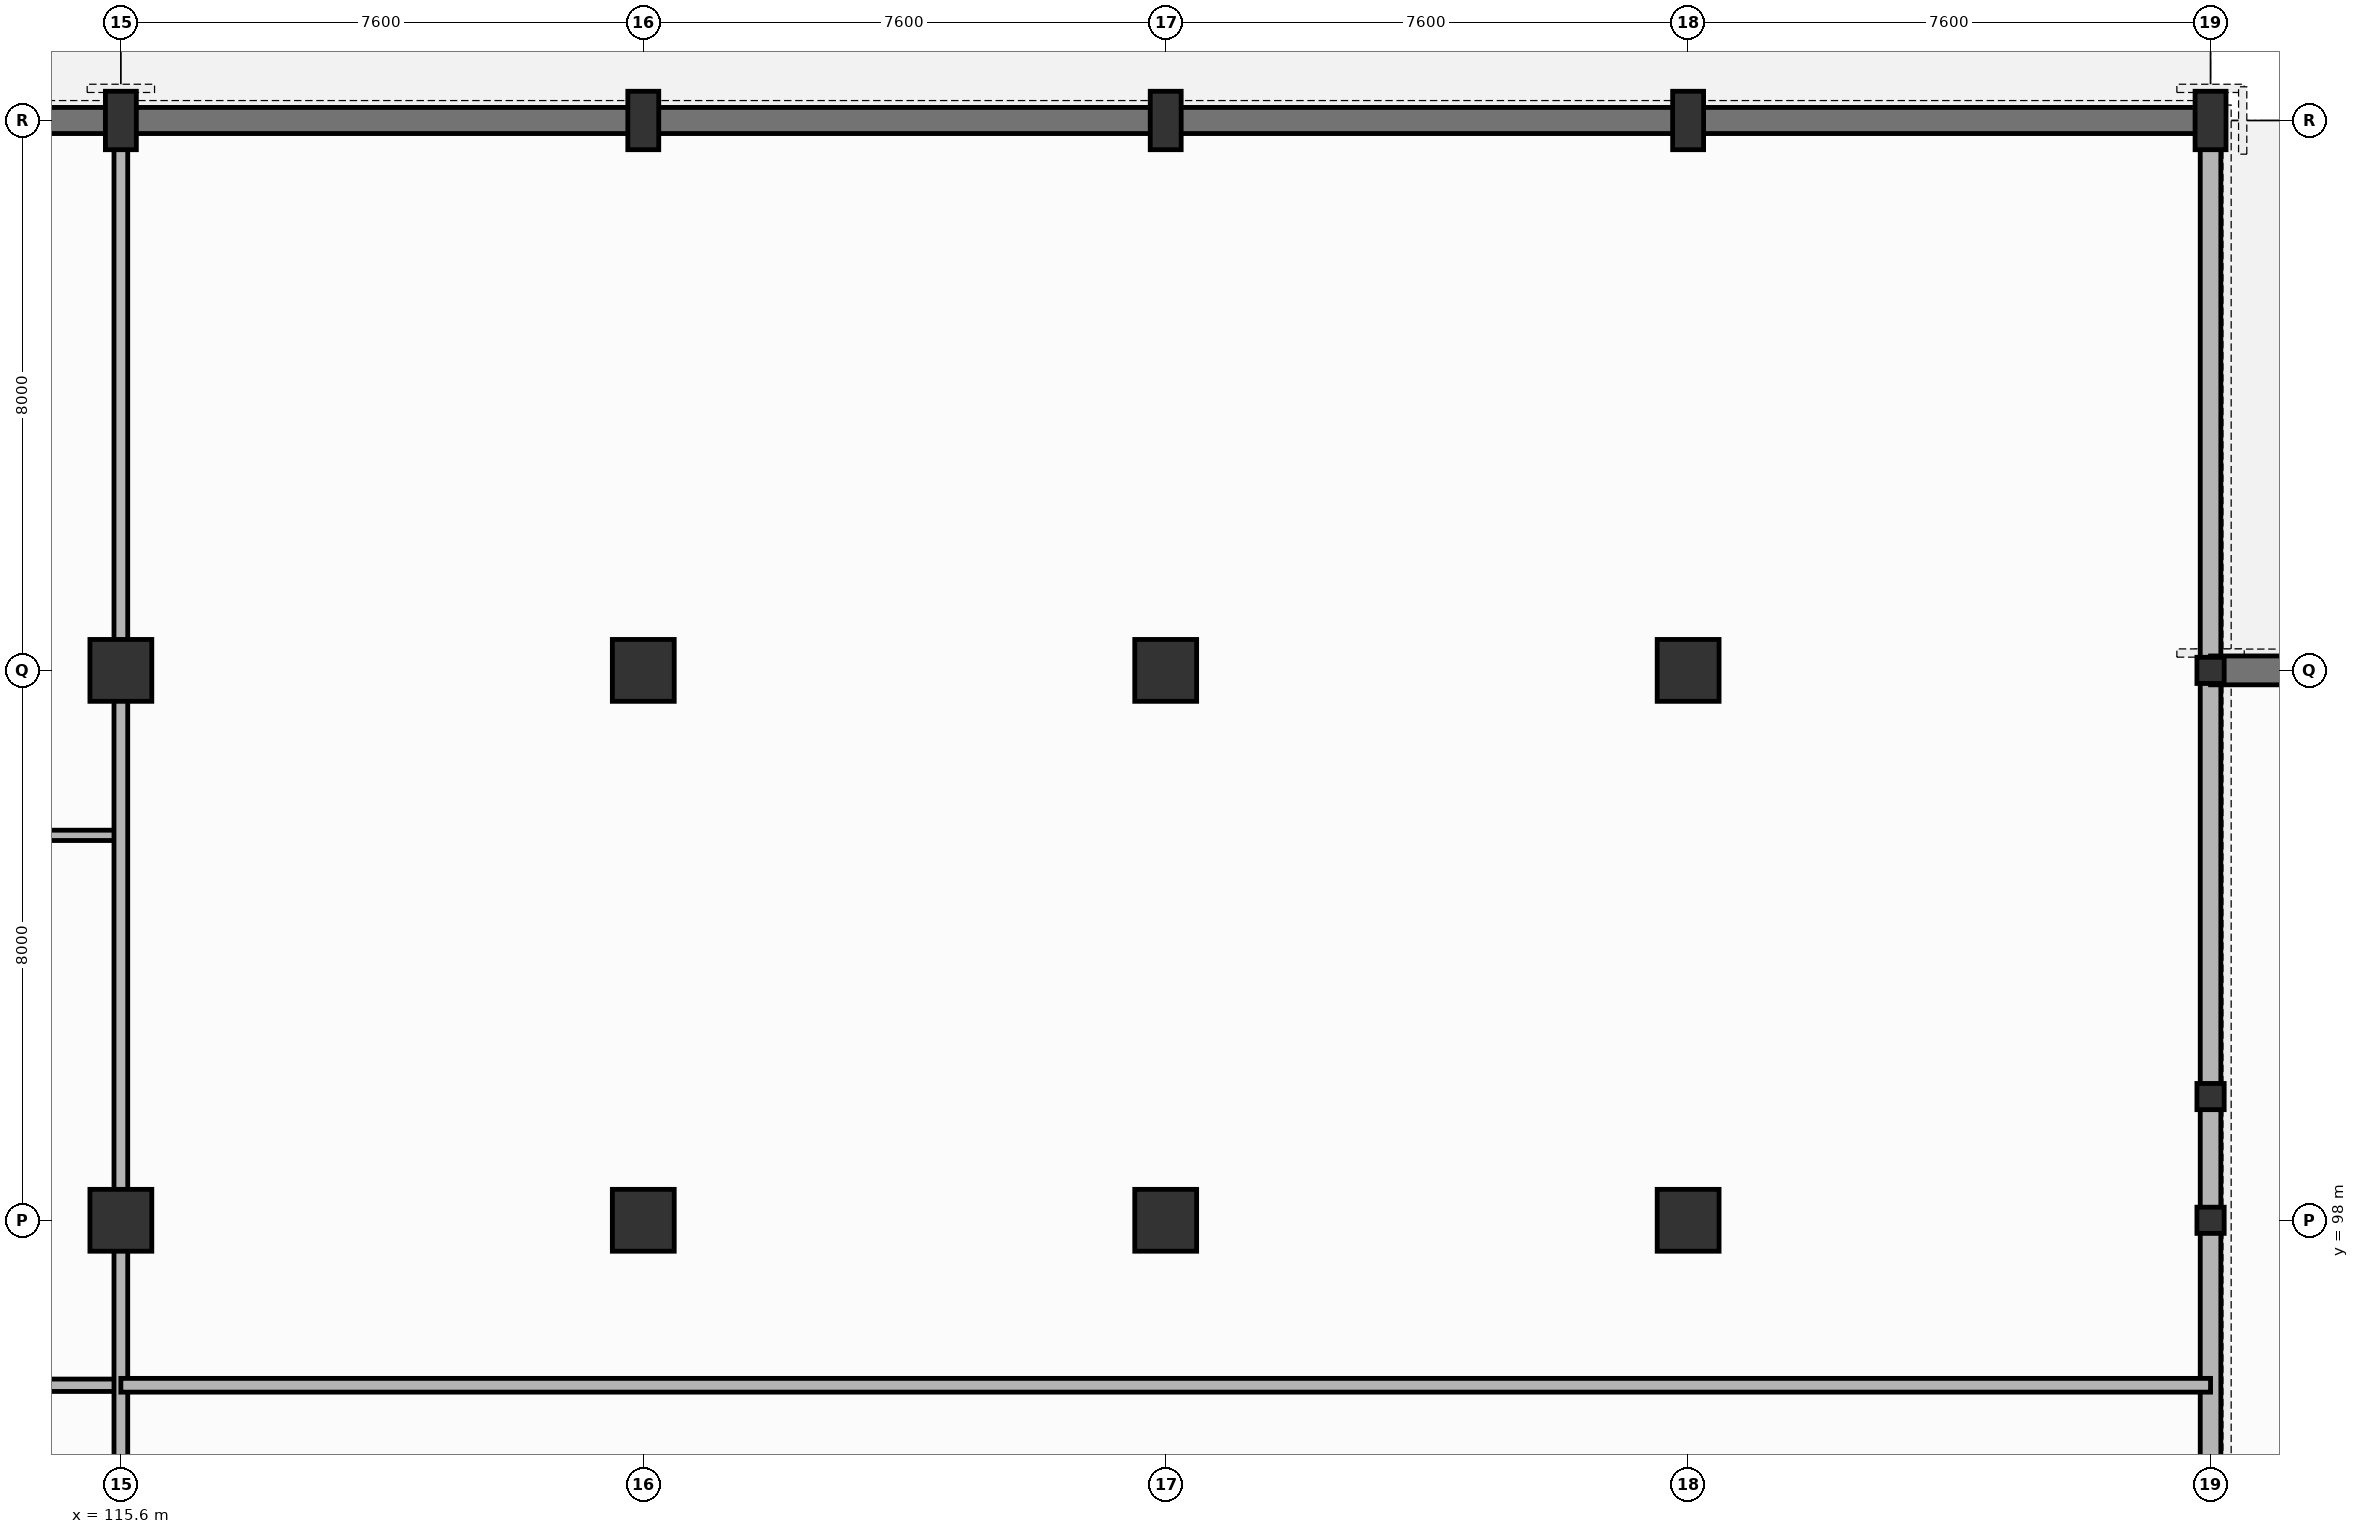
"""IFC4 building model, lengths in metres.
Left out: names, types, materials, properties, quantities, classifications, styles, units other than length and angle.
Written with IfcOpenShell. Run it as: python <this file> out.ifc"""

import sys

from ifc_helpers import new_model, si_unit, direction, frame, frame_2d, origin, origin_2d, place, context, subcontext, project, spatial, rectangle, i_section, extrude, element, fill, save


model = new_model("IFC4")
c1 = context("Model", 3, precision=1e-05, world=origin(), true_north=direction((0.0, 1.0)))
c2 = subcontext(c1, "Body", "Model", "MODEL_VIEW")
j1 = project(units=[si_unit("LENGTHUNIT", "METRE"), si_unit("PLANEANGLEUNIT", "RADIAN")], contexts=[c1])
p1 = place(None, origin())
s1 = spatial("IfcSite", under=j1, at=p1, CompositionType="ELEMENT")
p2 = place(p1, origin())
s2 = spatial("IfcBuilding", under=s1, at=p2, CompositionType="ELEMENT")
p3 = place(p2, origin())
s3 = spatial("IfcBuildingStorey", under=s2, at=p3, CompositionType="ELEMENT", Elevation=0.0)
for number, where, z_axis, x_axis in (
    (1, (115.6, 98.0, 0.0), (0.0, 0.0, 1.0), (1.0, 0.0, 0.0)),
    (2, (115.6, 106.0, 0.0), (0.0, 0.0, 1.0), (1.0, 0.0, 0.0)),
):
    element("IfcColumn", number, at=place(p3, frame(where, z_axis=z_axis, x_axis=x_axis)), inside=s3, PredefinedType="COLUMN", context=c2, shape_type="SweptSolid", body=[
        extrude(rectangle(XDim=0.9, YDim=0.9, at=origin_2d()), origin(), (0.0, 0.0, 1.0), 5.1),
    ])
p4 = place(p3, frame((115.6, 114.0, 0.0), z_axis=(0.0, 0.0, 1.0), x_axis=(0.0, 1.0, 0.0)))
e3 = element("IfcColumn", 3, at=p4, inside=s3, PredefinedType="COLUMN", context=c2, shape_type="SweptSolid", body=[
    extrude(rectangle(XDim=0.45, YDim=0.85, at=origin_2d()), origin(), (0.0, 0.0, 1.0), 5.1),
])
for number, where, z_axis, x_axis in (
    (4, (123.2, 98.0, 0.0), (0.0, 0.0, 1.0), (1.0, 0.0, 0.0)),
    (5, (123.2, 106.0, 0.0), (0.0, 0.0, 1.0), (1.0, 0.0, 0.0)),
):
    element("IfcColumn", number, at=place(p3, frame(where, z_axis=z_axis, x_axis=x_axis)), inside=s3, PredefinedType="COLUMN", context=c2, shape_type="SweptSolid", body=[
        extrude(rectangle(XDim=0.9, YDim=0.9, at=origin_2d()), origin(), (0.0, 0.0, 1.0), 5.1),
    ])
p5 = place(p3, frame((123.2, 114.0, 0.0), z_axis=(0.0, 0.0, 1.0), x_axis=(0.0, 1.0, 0.0)))
e6 = element("IfcColumn", 6, at=p5, inside=s3, PredefinedType="COLUMN", context=c2, shape_type="SweptSolid", body=[
    extrude(rectangle(XDim=0.45, YDim=0.85, at=origin_2d()), origin(), (0.0, 0.0, 1.0), 5.1),
])
for number, where, z_axis, x_axis in (
    (7, (130.8, 98.0, 0.0), (0.0, 0.0, 1.0), (1.0, 0.0, 0.0)),
    (8, (130.8, 106.0, 0.0), (0.0, 0.0, 1.0), (1.0, 0.0, 0.0)),
):
    element("IfcColumn", number, at=place(p3, frame(where, z_axis=z_axis, x_axis=x_axis)), inside=s3, PredefinedType="COLUMN", context=c2, shape_type="SweptSolid", body=[
        extrude(rectangle(XDim=0.9, YDim=0.9, at=origin_2d()), origin(), (0.0, 0.0, 1.0), 5.1),
    ])
p6 = place(p3, frame((130.8, 114.0, 0.0), z_axis=(0.0, 0.0, 1.0), x_axis=(0.0, 1.0, 0.0)))
e9 = element("IfcColumn", 9, at=p6, inside=s3, PredefinedType="COLUMN", context=c2, shape_type="SweptSolid", body=[
    extrude(rectangle(XDim=0.45, YDim=0.85, at=origin_2d()), origin(), (0.0, 0.0, 1.0), 5.1),
])
for number, where, z_axis, x_axis in (
    (10, (138.4, 98.0, 0.0), (0.0, 0.0, 1.0), (1.0, 0.0, 0.0)),
    (11, (138.4, 106.0, 0.0), (0.0, 0.0, 1.0), (1.0, 0.0, 0.0)),
):
    element("IfcColumn", number, at=place(p3, frame(where, z_axis=z_axis, x_axis=x_axis)), inside=s3, PredefinedType="COLUMN", context=c2, shape_type="SweptSolid", body=[
        extrude(rectangle(XDim=0.9, YDim=0.9, at=origin_2d()), origin(), (0.0, 0.0, 1.0), 5.1),
    ])
p7 = place(p3, frame((138.4, 114.0, 0.0), z_axis=(0.0, 0.0, 1.0), x_axis=(0.0, 1.0, 0.0)))
e12 = element("IfcColumn", 12, at=p7, inside=s3, PredefinedType="COLUMN", context=c2, shape_type="SweptSolid", body=[
    extrude(rectangle(XDim=0.45, YDim=0.85, at=origin_2d()), origin(), (0.0, 0.0, 1.0), 5.1),
])
for number, where, z_axis, x_axis in (
    (13, (146.0, 98.0, 0.0), (0.0, 0.0, 1.0), (1.0, 0.0, 0.0)),
    (14, (146.0, 106.0, 0.0), (0.0, 0.0, 1.0), (1.0, 0.0, 0.0)),
):
    element("IfcColumn", number, at=place(p3, frame(where, z_axis=z_axis, x_axis=x_axis)), inside=s3, PredefinedType="COLUMN", context=c2, shape_type="SweptSolid", body=[
        extrude(i_section(OverallWidth=0.396, OverallDepth=0.381, WebThickness=0.019, FlangeThickness=0.03, at=origin_2d()), origin(), (0.0, 0.0, 1.0), 5.1),
    ])
p8 = place(p3, frame((146.0, 114.0, 0.0), z_axis=(0.0, 0.0, 1.0), x_axis=(0.0, 1.0, 0.0)))
e15 = element("IfcColumn", 15, at=p8, inside=s3, PredefinedType="COLUMN", context=c2, shape_type="SweptSolid", body=[
    extrude(rectangle(XDim=0.45, YDim=0.85, at=origin_2d()), origin(), (0.0, 0.0, 1.0), 5.1),
])
p9 = place(p3, frame((146.0, 99.8, 0.0), z_axis=(0.0, 0.0, 1.0), x_axis=(1.0, 0.0, 0.0)))
e16 = element("IfcColumn", 16, at=p9, inside=s3, PredefinedType="COLUMN", context=c2, shape_type="SweptSolid", body=[
    extrude(i_section(OverallWidth=0.396, OverallDepth=0.381, WebThickness=0.019, FlangeThickness=0.03, at=origin_2d()), origin(), (0.0, 0.0, 1.0), 5.1),
])
p10 = place(p3, frame((108.0, 114.0, 0.0), z_axis=(0.0, 0.0, 1.0), x_axis=(1.0, 0.0, 0.0)))
e17 = element("IfcWall", 17, at=p10, inside=s3, PredefinedType="SOLIDWALL", context=c2, shape_type="SweptSolid", body=[
    extrude(rectangle(XDim=7.6, YDim=0.38, at=frame_2d((3.8, 0.0))), origin(), (0.0, 0.0, 1.0), 4.8),
])
p11 = place(p10, frame((2.2, 0.0, 1.15)))
e18 = element("IfcOpeningElement", 18, at=p11, cuts=e17, PredefinedType="OPENING", context=c2, shape_type="SweptSolid", body=[
    extrude(rectangle(XDim=0.75, YDim=2.2, at=frame_2d((0.375, 1.1))), frame((0.0, 0.2, 0.0), z_axis=(0.0, -1.0, 0.0), x_axis=(1.0, 0.0, 0.0)), (0.0, 0.0, 1.0), 0.4),
])
p12 = place(p10, frame((5.4, 0.0, 1.15)))
e19 = element("IfcOpeningElement", 19, at=p12, cuts=e17, PredefinedType="OPENING", context=c2, shape_type="SweptSolid", body=[
    extrude(rectangle(XDim=0.9, YDim=2.2, at=frame_2d((0.45, 1.1))), frame((0.0, 0.2, 0.0), z_axis=(0.0, -1.0, 0.0), x_axis=(1.0, 0.0, 0.0)), (0.0, 0.0, 1.0), 0.4),
])
p13 = place(p3, frame((115.6, 114.0, 0.0), z_axis=(0.0, 0.0, 1.0), x_axis=(1.0, 0.0, 0.0)))
e20 = element("IfcWall", 20, at=p13, inside=s3, PredefinedType="SOLIDWALL", context=c2, shape_type="SweptSolid", body=[
    extrude(rectangle(XDim=30.4, YDim=0.38, at=frame_2d((15.2, 0.0))), origin(), (0.0, 0.0, 1.0), 4.8),
])
p14 = place(p13, frame((1.95, 0.0, 0.0)))
e21 = element("IfcOpeningElement", 21, at=p14, cuts=e20, PredefinedType="OPENING", context=c2, shape_type="SweptSolid", body=[
    extrude(rectangle(XDim=3.7, YDim=4.0, at=frame_2d((1.85, 2.0))), frame((0.0, 0.2, 0.0), z_axis=(0.0, -1.0, 0.0), x_axis=(1.0, 0.0, 0.0)), (0.0, 0.0, 1.0), 0.4),
])
p15 = place(p13, frame((9.55, 0.0, 0.0)))
e22 = element("IfcOpeningElement", 22, at=p15, cuts=e20, PredefinedType="OPENING", context=c2, shape_type="SweptSolid", body=[
    extrude(rectangle(XDim=3.7, YDim=4.0, at=frame_2d((1.85, 2.0))), frame((0.0, 0.2, 0.0), z_axis=(0.0, -1.0, 0.0), x_axis=(1.0, 0.0, 0.0)), (0.0, 0.0, 1.0), 0.4),
])
p16 = place(p13, frame((17.15, 0.0, 0.0)))
e23 = element("IfcOpeningElement", 23, at=p16, cuts=e20, PredefinedType="OPENING", context=c2, shape_type="SweptSolid", body=[
    extrude(rectangle(XDim=3.7, YDim=4.0, at=frame_2d((1.85, 2.0))), frame((0.0, 0.2, 0.0), z_axis=(0.0, -1.0, 0.0), x_axis=(1.0, 0.0, 0.0)), (0.0, 0.0, 1.0), 0.4),
])
p17 = place(p13, frame((24.75, 0.0, 0.0)))
e24 = element("IfcOpeningElement", 24, at=p17, cuts=e20, PredefinedType="OPENING", context=c2, shape_type="SweptSolid", body=[
    extrude(rectangle(XDim=3.7, YDim=4.0, at=frame_2d((1.85, 2.0))), frame((0.0, 0.2, 0.0), z_axis=(0.0, -1.0, 0.0), x_axis=(1.0, 0.0, 0.0)), (0.0, 0.0, 1.0), 0.4),
])
p18 = place(p3, frame((146.0, 82.2, 0.0), z_axis=(0.0, 0.0, 1.0), x_axis=(0.0, 1.0, 0.0)))
e25 = element("IfcWall", 25, at=p18, inside=s3, PredefinedType="SOLIDWALL", context=c2, shape_type="SweptSolid", body=[
    extrude(rectangle(XDim=31.8, YDim=0.3, at=frame_2d((15.9, 0.0))), origin(), (0.0, 0.0, 1.0), 4.145),
])
p19 = place(p18, frame((24.45, 0.0, 0.0)))
e26 = element("IfcOpeningElement", 26, at=p19, cuts=e25, PredefinedType="OPENING", context=c2, shape_type="SweptSolid", body=[
    extrude(rectangle(XDim=3.2, YDim=3.6, at=frame_2d((1.6, 1.8))), frame((0.0, 0.16, 0.0), z_axis=(0.0, -1.0, 0.0), x_axis=(1.0, 0.0, 0.0)), (0.0, 0.0, 1.0), 0.32),
])
p20 = place(p18, frame((28.0, 0.0, 0.0)))
e27 = element("IfcOpeningElement", 27, at=p20, cuts=e25, PredefinedType="OPENING", context=c2, shape_type="SweptSolid", body=[
    extrude(rectangle(XDim=3.2, YDim=3.6, at=frame_2d((1.6, 1.8))), frame((0.0, 0.16, 0.0), z_axis=(0.0, -1.0, 0.0), x_axis=(1.0, 0.0, 0.0)), (0.0, 0.0, 1.0), 0.32),
])
p21 = place(p3, frame((146.0, 106.0, 0.0), z_axis=(0.0, 0.0, 1.0), x_axis=(1.0, 0.0, 0.0)))
e28 = element("IfcWall", 28, at=p21, inside=s3, PredefinedType="SOLIDWALL", context=c2, shape_type="SweptSolid", body=[
    extrude(rectangle(XDim=16.6, YDim=0.42, at=frame_2d((8.3, 0.0))), origin(), (0.0, 0.0, 1.0), 4.8),
])
p22 = place(p21, frame((3.5, 0.0, 1.0)))
e29 = element("IfcOpeningElement", 29, at=p22, cuts=e28, PredefinedType="OPENING", context=c2, shape_type="SweptSolid", body=[
    extrude(rectangle(XDim=1.2, YDim=2.1, at=frame_2d((0.6, 1.05))), frame((0.0, 0.22, 0.0), z_axis=(0.0, -1.0, 0.0), x_axis=(1.0, 0.0, 0.0)), (0.0, 0.0, 1.0), 0.44),
])
p23 = place(p21, frame((10.5, 0.0, 1.0)))
e30 = element("IfcOpeningElement", 30, at=p23, cuts=e28, PredefinedType="OPENING", context=c2, shape_type="SweptSolid", body=[
    extrude(rectangle(XDim=1.2, YDim=2.1, at=frame_2d((0.6, 1.05))), frame((0.0, 0.22, 0.0), z_axis=(0.0, -1.0, 0.0), x_axis=(1.0, 0.0, 0.0)), (0.0, 0.0, 1.0), 0.44),
])
p24 = place(p3, frame((111.4, 95.6, 0.0), z_axis=(0.0, 0.0, 1.0), x_axis=(1.0, 0.0, 0.0)))
e31 = element("IfcWall", 31, at=p24, inside=s3, PredefinedType="PLUMBINGWALL", context=c2, shape_type="SweptSolid", body=[
    extrude(rectangle(XDim=4.2, YDim=0.18, at=frame_2d((2.1, 0.0))), origin(), (0.0, 0.0, 1.0), 4.8),
])
p25 = place(p24, frame((1.625, 0.0, 0.0)))
e32 = element("IfcOpeningElement", 32, at=p25, cuts=e31, PredefinedType="OPENING", context=c2, shape_type="SweptSolid", body=[
    extrude(rectangle(XDim=0.95, YDim=2.15, at=frame_2d((0.475, 1.075))), frame((0.0, 0.1, 0.0), z_axis=(0.0, -1.0, 0.0), x_axis=(1.0, 0.0, 0.0)), (0.0, 0.0, 1.0), 0.2),
])
p26 = place(p3, frame((99.0, 103.6, 0.0), z_axis=(0.0, 0.0, 1.0), x_axis=(1.0, 0.0, 0.0)))
e33 = element("IfcWall", 33, at=p26, inside=s3, PredefinedType="PARTITIONING", context=c2, shape_type="SweptSolid", body=[
    extrude(rectangle(XDim=16.6, YDim=0.15, at=frame_2d((8.3, 0.0))), origin(), (0.0, 0.0, 1.0), 4.8),
])
p27 = place(p26, frame((7.5, 0.0, 0.0)))
e34 = element("IfcOpeningElement", 34, at=p27, cuts=e33, PredefinedType="OPENING", context=c2, shape_type="SweptSolid", body=[
    extrude(rectangle(XDim=1.0, YDim=2.15, at=frame_2d((0.5, 1.075))), frame((0.0, 0.085, 0.0), z_axis=(0.0, -1.0, 0.0), x_axis=(1.0, 0.0, 0.0)), (0.0, 0.0, 1.0), 0.17),
])
p28 = place(p3, frame((115.6, 82.2, 0.0), z_axis=(0.0, 0.0, 1.0), x_axis=(0.0, 1.0, 0.0)))
e35 = element("IfcWall", 35, at=p28, inside=s3, PredefinedType="PARTITIONING", context=c2, shape_type="SweptSolid", body=[
    extrude(rectangle(XDim=31.8, YDim=0.2, at=frame_2d((15.9, 0.0))), origin(), (0.0, 0.0, 1.0), 4.045),
])
p29 = place(p28, frame((18.0, 0.0, 0.0)))
e36 = element("IfcOpeningElement", 36, at=p29, cuts=e35, PredefinedType="OPENING", context=c2, shape_type="SweptSolid", body=[
    extrude(rectangle(XDim=1.6, YDim=2.2, at=frame_2d((0.8, 1.1))), frame((0.0, 0.11, 0.0), z_axis=(0.0, -1.0, 0.0), x_axis=(1.0, 0.0, 0.0)), (0.0, 0.0, 1.0), 0.22),
])
p30 = place(p3, frame((115.6, 95.6, 0.0), z_axis=(0.0, 0.0, 1.0), x_axis=(1.0, 0.0, 0.0)))
e37 = element("IfcWall", 37, at=p30, inside=s3, PredefinedType="PARTITIONING", context=c2, shape_type="SweptSolid", body=[
    extrude(rectangle(XDim=30.4, YDim=0.2, at=frame_2d((15.2, 0.0))), origin(), (0.0, 0.0, 1.0), 4.045),
])
p31 = place(p30, frame((6.0, 0.0, 0.0)))
e38 = element("IfcOpeningElement", 38, at=p31, cuts=e37, PredefinedType="OPENING", context=c2, shape_type="SweptSolid", body=[
    extrude(rectangle(XDim=1.6, YDim=2.2, at=frame_2d((0.8, 1.1))), frame((0.0, 0.11, 0.0), z_axis=(0.0, -1.0, 0.0), x_axis=(1.0, 0.0, 0.0)), (0.0, 0.0, 1.0), 0.22),
])
p32 = place(p30, frame((20.0, 0.0, 0.0)))
e39 = element("IfcOpeningElement", 39, at=p32, cuts=e37, PredefinedType="OPENING", context=c2, shape_type="SweptSolid", body=[
    extrude(rectangle(XDim=1.6, YDim=2.2, at=frame_2d((0.8, 1.1))), frame((0.0, 0.11, 0.0), z_axis=(0.0, -1.0, 0.0), x_axis=(1.0, 0.0, 0.0)), (0.0, 0.0, 1.0), 0.22),
])
p33 = place(p14, origin())
e40 = element("IfcDoor", 40, at=p33, inside=s3, OperationType="ROLLINGUP", PredefinedType="GATE", context=c2, shape_type="SweptSolid", body=[
    extrude(rectangle(XDim=3.7, YDim=4.0, at=frame_2d((1.85, 2.0))), frame((0.0, 0.025, 0.0), z_axis=(0.0, -1.0, 0.0), x_axis=(1.0, 0.0, 0.0)), (0.0, 0.0, 1.0), 0.05),
])
fill(e21, e40)
p34 = place(p15, origin())
e41 = element("IfcDoor", 41, at=p34, inside=s3, OperationType="ROLLINGUP", PredefinedType="GATE", context=c2, shape_type="SweptSolid", body=[
    extrude(rectangle(XDim=3.7, YDim=4.0, at=frame_2d((1.85, 2.0))), frame((0.0, 0.025, 0.0), z_axis=(0.0, -1.0, 0.0), x_axis=(1.0, 0.0, 0.0)), (0.0, 0.0, 1.0), 0.05),
])
fill(e22, e41)
p35 = place(p16, origin())
e42 = element("IfcDoor", 42, at=p35, inside=s3, OperationType="ROLLINGUP", PredefinedType="GATE", context=c2, shape_type="SweptSolid", body=[
    extrude(rectangle(XDim=3.7, YDim=4.0, at=frame_2d((1.85, 2.0))), frame((0.0, 0.025, 0.0), z_axis=(0.0, -1.0, 0.0), x_axis=(1.0, 0.0, 0.0)), (0.0, 0.0, 1.0), 0.05),
])
fill(e23, e42)
p36 = place(p17, origin())
e43 = element("IfcDoor", 43, at=p36, inside=s3, OperationType="ROLLINGUP", PredefinedType="GATE", context=c2, shape_type="SweptSolid", body=[
    extrude(rectangle(XDim=3.7, YDim=4.0, at=frame_2d((1.85, 2.0))), frame((0.0, 0.025, 0.0), z_axis=(0.0, -1.0, 0.0), x_axis=(1.0, 0.0, 0.0)), (0.0, 0.0, 1.0), 0.05),
])
fill(e24, e43)
p37 = place(p19, frame((3.2, 0.0, 0.0), z_axis=(0.0, 0.0, 1.0), x_axis=(-1.0, 0.0, 0.0)))
e44 = element("IfcDoor", 44, at=p37, inside=s3, OperationType="DOUBLE_DOOR_FOLDING", PredefinedType="GATE", context=c2, shape_type="SweptSolid", body=[
    extrude(rectangle(XDim=3.2, YDim=3.6, at=frame_2d((1.6, 1.8))), frame((0.0, 0.025, 0.0), z_axis=(0.0, -1.0, 0.0), x_axis=(1.0, 0.0, 0.0)), (0.0, 0.0, 1.0), 0.05),
])
fill(e26, e44)
p38 = place(p20, frame((3.2, 0.0, 0.0), z_axis=(0.0, 0.0, 1.0), x_axis=(-1.0, 0.0, 0.0)))
e45 = element("IfcDoor", 45, at=p38, inside=s3, OperationType="DOUBLE_DOOR_FOLDING", PredefinedType="GATE", context=c2, shape_type="SweptSolid", body=[
    extrude(rectangle(XDim=3.2, YDim=3.6, at=frame_2d((1.6, 1.8))), frame((0.0, 0.025, 0.0), z_axis=(0.0, -1.0, 0.0), x_axis=(1.0, 0.0, 0.0)), (0.0, 0.0, 1.0), 0.05),
])
fill(e27, e45)
p39 = place(p29, origin())
e46 = element("IfcDoor", 46, at=p39, inside=s3, OperationType="DOUBLE_DOOR_SINGLE_SWING", PredefinedType="DOOR", context=c2, shape_type="SweptSolid", body=[
    extrude(rectangle(XDim=1.6, YDim=2.2, at=frame_2d((0.8, 1.1))), frame((0.0, 0.025, 0.0), z_axis=(0.0, -1.0, 0.0), x_axis=(1.0, 0.0, 0.0)), (0.0, 0.0, 1.0), 0.05),
])
fill(e36, e46)
p40 = place(p31, origin())
e47 = element("IfcDoor", 47, at=p40, inside=s3, OperationType="DOUBLE_DOOR_SINGLE_SWING", PredefinedType="DOOR", context=c2, shape_type="SweptSolid", body=[
    extrude(rectangle(XDim=1.6, YDim=2.2, at=frame_2d((0.8, 1.1))), frame((0.0, 0.025, 0.0), z_axis=(0.0, -1.0, 0.0), x_axis=(1.0, 0.0, 0.0)), (0.0, 0.0, 1.0), 0.05),
])
fill(e38, e47)
p41 = place(p32, origin())
e48 = element("IfcDoor", 48, at=p41, inside=s3, OperationType="DOUBLE_DOOR_SINGLE_SWING", PredefinedType="DOOR", context=c2, shape_type="SweptSolid", body=[
    extrude(rectangle(XDim=1.6, YDim=2.2, at=frame_2d((0.8, 1.1))), frame((0.0, 0.025, 0.0), z_axis=(0.0, -1.0, 0.0), x_axis=(1.0, 0.0, 0.0)), (0.0, 0.0, 1.0), 0.05),
])
fill(e39, e48)
save(model, sys.argv[1])
